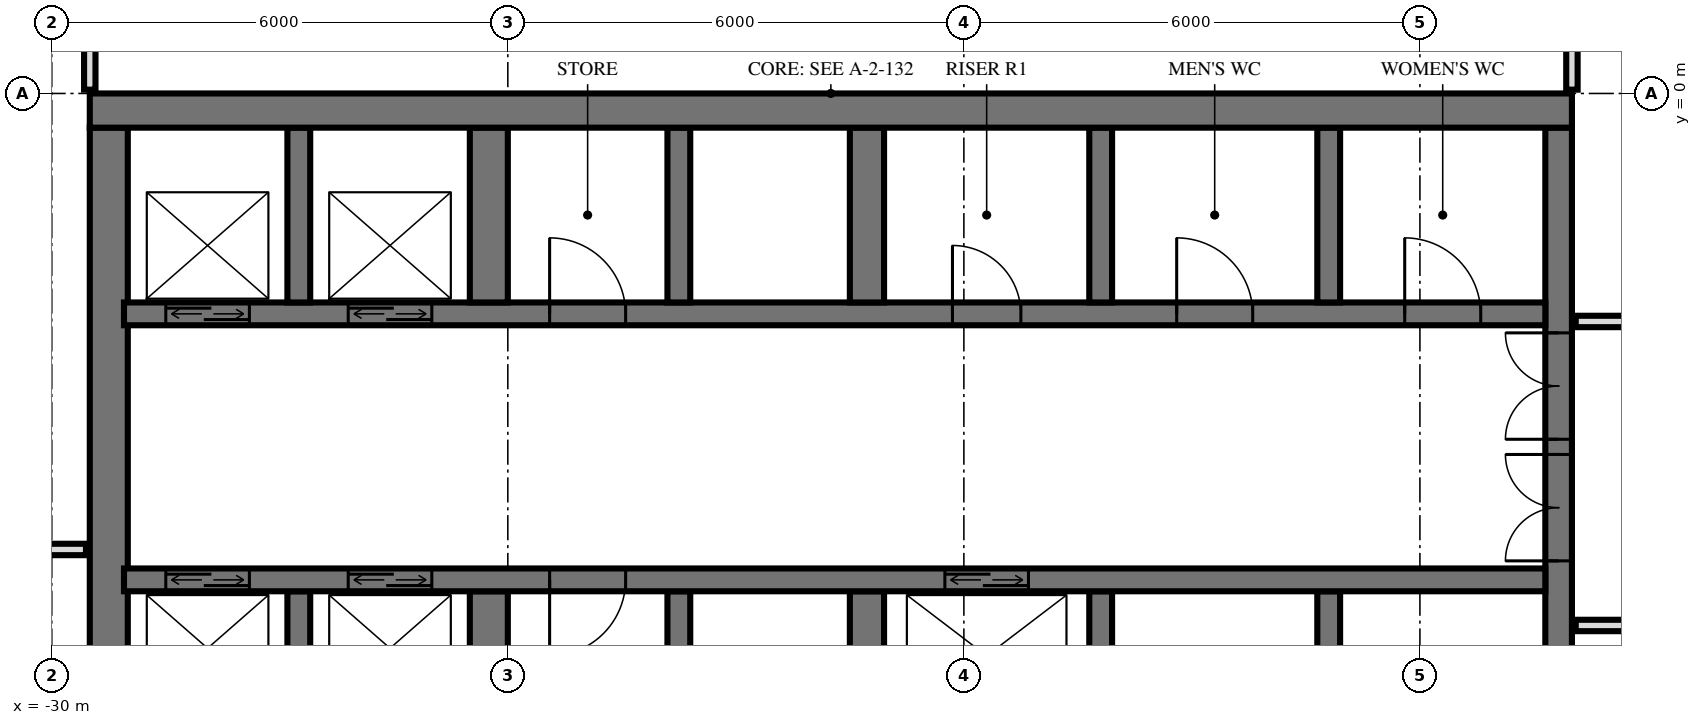
"""IFC4 building model, lengths in metres.
Left out: names, types, materials, properties, quantities, classifications, styles, units other than length and angle.
Written with IfcOpenShell. Run it as: python <this file> out.ifc"""

import sys

from ifc_helpers import new_model, si_unit, direction, frame, frame_2d, origin, place, context, subcontext, project, spatial, rectangle, extrude, element, fill, save


model = new_model("IFC4")
c1 = context("Model", 3, precision=1e-05, world=origin(), true_north=direction((0.0, 1.0)))
c2 = subcontext(c1, "Body", "Model", "MODEL_VIEW")
j1 = project(units=[si_unit("LENGTHUNIT", "METRE"), si_unit("PLANEANGLEUNIT", "RADIAN")], contexts=[c1])
p1 = place(None, origin())
s1 = spatial("IfcSite", under=j1, at=p1, CompositionType="ELEMENT")
p2 = place(p1, origin())
s2 = spatial("IfcBuilding", under=s1, at=p2, CompositionType="ELEMENT")
p3 = place(p2, frame((0.0, 0.0, 52.8)))
s3 = spatial("IfcBuildingStorey", under=s2, at=p3, CompositionType="ELEMENT", Elevation=52.8)
p4 = place(p3, frame((-29.5, -0.225, 0.0), z_axis=(0.0, 0.0, 1.0), x_axis=(1.0, 0.0, 0.0)))
e1 = element("IfcWall", 1, at=p4, inside=s3, PredefinedType="SHEAR", context=c2, shape_type="SweptSolid", body=[
    extrude(rectangle(XDim=19.5, YDim=0.45, at=frame_2d((9.75, 0.0))), origin(), (0.0, 0.0, 1.0), 3.6),
])
p5 = place(p3, frame((-10.175, -14.55, 0.0), z_axis=(0.0, 0.0, 1.0), x_axis=(0.0, 1.0, 0.0)))
e2 = element("IfcWall", 2, at=p5, inside=s3, PredefinedType="SHEAR", context=c2, shape_type="SweptSolid", body=[
    extrude(rectangle(XDim=14.1, YDim=0.35, at=frame_2d((7.05, 0.0))), origin(), (0.0, 0.0, 1.0), 3.6),
])
p6 = place(p5, frame((8.4, 0.0, 0.0)))
e3 = element("IfcOpeningElement", 3, at=p6, cuts=e2, PredefinedType="OPENING", context=c2, shape_type="SweptSolid", body=[
    extrude(rectangle(XDim=1.4, YDim=2.4, at=frame_2d((0.7, 1.2))), frame((0.0, 0.185, 0.0), z_axis=(0.0, -1.0, 0.0), x_axis=(1.0, 0.0, 0.0)), (0.0, 0.0, 1.0), 0.37),
])
p7 = place(p5, frame((10.0, 0.0, 0.0)))
e4 = element("IfcOpeningElement", 4, at=p7, cuts=e2, PredefinedType="OPENING", context=c2, shape_type="SweptSolid", body=[
    extrude(rectangle(XDim=1.4, YDim=2.4, at=frame_2d((0.7, 1.2))), frame((0.0, 0.185, 0.0), z_axis=(0.0, -1.0, 0.0), x_axis=(1.0, 0.0, 0.0)), (0.0, 0.0, 1.0), 0.37),
])
p8 = place(p5, frame((4.0, 0.0, 0.0)))
e5 = element("IfcOpeningElement", 5, at=p8, cuts=e2, PredefinedType="OPENING", context=c2, shape_type="SweptSolid", body=[
    extrude(rectangle(XDim=1.2, YDim=2.1, at=frame_2d((0.6, 1.05))), frame((0.0, 0.185, 0.0), z_axis=(0.0, -1.0, 0.0), x_axis=(1.0, 0.0, 0.0)), (0.0, 0.0, 1.0), 0.37),
])
p9 = place(p3, frame((-29.25, -14.55, 0.0), z_axis=(0.0, 0.0, 1.0), x_axis=(0.0, 1.0, 0.0)))
e6 = element("IfcWall", 6, at=p9, inside=s3, PredefinedType="SHEAR", context=c2, shape_type="SweptSolid", body=[
    extrude(rectangle(XDim=14.1, YDim=0.5, at=frame_2d((7.05, 0.0))), origin(), (0.0, 0.0, 1.0), 3.6),
])
p10 = place(p3, frame((-29.05, -2.9, 0.0), z_axis=(0.0, 0.0, 1.0), x_axis=(1.0, 0.0, 0.0)))
e7 = element("IfcWall", 7, at=p10, inside=s3, PredefinedType="SHEAR", context=c2, shape_type="SweptSolid", body=[
    extrude(rectangle(XDim=18.7, YDim=0.3, at=frame_2d((9.35, 0.0))), origin(), (0.0, 0.0, 1.0), 3.6),
])
p11 = place(p10, frame((2.95, 0.0, 0.0)))
e8 = element("IfcOpeningElement", 8, at=p11, cuts=e7, PredefinedType="OPENING", context=c2, shape_type="SweptSolid", body=[
    extrude(rectangle(XDim=1.1, YDim=2.1, at=frame_2d((0.55, 1.05))), frame((0.0, 0.16, 0.0), z_axis=(0.0, -1.0, 0.0), x_axis=(1.0, 0.0, 0.0)), (0.0, 0.0, 1.0), 0.32),
])
p12 = place(p10, frame((0.55, 0.0, 0.0)))
e9 = element("IfcOpeningElement", 9, at=p12, cuts=e7, PredefinedType="OPENING", context=c2, shape_type="SweptSolid", body=[
    extrude(rectangle(XDim=1.1, YDim=2.1, at=frame_2d((0.55, 1.05))), frame((0.0, 0.16, 0.0), z_axis=(0.0, -1.0, 0.0), x_axis=(1.0, 0.0, 0.0)), (0.0, 0.0, 1.0), 0.32),
])
p13 = place(p10, frame((10.9, 0.0, 0.0)))
e10 = element("IfcOpeningElement", 10, at=p13, cuts=e7, PredefinedType="OPENING", context=c2, shape_type="SweptSolid", body=[
    extrude(rectangle(XDim=0.9, YDim=2.1, at=frame_2d((0.45, 1.05))), frame((0.0, 0.16, 0.0), z_axis=(0.0, -1.0, 0.0), x_axis=(1.0, 0.0, 0.0)), (0.0, 0.0, 1.0), 0.32),
])
p14 = place(p10, frame((16.85, 0.0, 0.0)))
e11 = element("IfcOpeningElement", 11, at=p14, cuts=e7, PredefinedType="OPENING", context=c2, shape_type="SweptSolid", body=[
    extrude(rectangle(XDim=1.0, YDim=2.1, at=frame_2d((0.5, 1.05))), frame((0.0, 0.16, 0.0), z_axis=(0.0, -1.0, 0.0), x_axis=(1.0, 0.0, 0.0)), (0.0, 0.0, 1.0), 0.32),
])
p15 = place(p10, frame((13.85, 0.0, 0.0)))
e12 = element("IfcOpeningElement", 12, at=p15, cuts=e7, PredefinedType="OPENING", context=c2, shape_type="SweptSolid", body=[
    extrude(rectangle(XDim=1.0, YDim=2.1, at=frame_2d((0.5, 1.05))), frame((0.0, 0.16, 0.0), z_axis=(0.0, -1.0, 0.0), x_axis=(1.0, 0.0, 0.0)), (0.0, 0.0, 1.0), 0.32),
])
p16 = place(p10, frame((5.6, 0.0, 0.0)))
e13 = element("IfcOpeningElement", 13, at=p16, cuts=e7, PredefinedType="OPENING", context=c2, shape_type="SweptSolid", body=[
    extrude(rectangle(XDim=1.0, YDim=2.1, at=frame_2d((0.5, 1.05))), frame((0.0, 0.16, 0.0), z_axis=(0.0, -1.0, 0.0), x_axis=(1.0, 0.0, 0.0)), (0.0, 0.0, 1.0), 0.32),
])
p17 = place(p3, frame((-29.05, -6.4, 0.0), z_axis=(0.0, 0.0, 1.0), x_axis=(1.0, 0.0, 0.0)))
e14 = element("IfcWall", 14, at=p17, inside=s3, PredefinedType="SHEAR", context=c2, shape_type="SweptSolid", body=[
    extrude(rectangle(XDim=18.7, YDim=0.3, at=frame_2d((9.35, 0.0))), origin(), (0.0, 0.0, 1.0), 3.6),
])
p18 = place(p17, frame((2.95, 0.0, 0.0)))
e15 = element("IfcOpeningElement", 15, at=p18, cuts=e14, PredefinedType="OPENING", context=c2, shape_type="SweptSolid", body=[
    extrude(rectangle(XDim=1.1, YDim=2.1, at=frame_2d((0.55, 1.05))), frame((0.0, 0.16, 0.0), z_axis=(0.0, -1.0, 0.0), x_axis=(1.0, 0.0, 0.0)), (0.0, 0.0, 1.0), 0.32),
])
p19 = place(p17, frame((0.55, 0.0, 0.0)))
e16 = element("IfcOpeningElement", 16, at=p19, cuts=e14, PredefinedType="OPENING", context=c2, shape_type="SweptSolid", body=[
    extrude(rectangle(XDim=1.1, YDim=2.1, at=frame_2d((0.55, 1.05))), frame((0.0, 0.16, 0.0), z_axis=(0.0, -1.0, 0.0), x_axis=(1.0, 0.0, 0.0)), (0.0, 0.0, 1.0), 0.32),
])
p20 = place(p17, frame((10.8, 0.0, 0.0)))
e17 = element("IfcOpeningElement", 17, at=p20, cuts=e14, PredefinedType="OPENING", context=c2, shape_type="SweptSolid", body=[
    extrude(rectangle(XDim=1.1, YDim=2.1, at=frame_2d((0.55, 1.05))), frame((0.0, 0.16, 0.0), z_axis=(0.0, -1.0, 0.0), x_axis=(1.0, 0.0, 0.0)), (0.0, 0.0, 1.0), 0.32),
])
p21 = place(p17, frame((5.6, 0.0, 0.0)))
e18 = element("IfcOpeningElement", 18, at=p21, cuts=e14, PredefinedType="OPENING", context=c2, shape_type="SweptSolid", body=[
    extrude(rectangle(XDim=1.0, YDim=2.1, at=frame_2d((0.5, 1.05))), frame((0.0, 0.16, 0.0), z_axis=(0.0, -1.0, 0.0), x_axis=(1.0, 0.0, 0.0)), (0.0, 0.0, 1.0), 0.32),
])
for number, where, z_axis, x_axis in (
    (19, (-13.2, -2.75, 0.0), (0.0, 0.0, 1.0), (0.0, 1.0, 0.0)),
    (20, (-13.2, -8.85, 0.0), (0.0, 0.0, 1.0), (0.0, 1.0, 0.0)),
    (21, (-16.2, -2.75, 0.0), (0.0, 0.0, 1.0), (0.0, 1.0, 0.0)),
    (22, (-16.2, -8.85, 0.0), (0.0, 0.0, 1.0), (0.0, 1.0, 0.0)),
):
    element("IfcWall", number, at=place(p3, frame(where, z_axis=z_axis, x_axis=x_axis)), inside=s3, PredefinedType="SHEAR", context=c2, shape_type="SweptSolid", body=[
        extrude(rectangle(XDim=2.3, YDim=0.3, at=frame_2d((1.15, 0.0))), origin(), (0.0, 0.0, 1.0), 3.6),
    ])
for number, where, z_axis, x_axis in (
    (23, (-19.275, -2.75, 0.0), (0.0, 0.0, 1.0), (0.0, 1.0, 0.0)),
    (24, (-19.275, -8.85, 0.0), (0.0, 0.0, 1.0), (0.0, 1.0, 0.0)),
):
    element("IfcWall", number, at=place(p3, frame(where, z_axis=z_axis, x_axis=x_axis)), inside=s3, PredefinedType="SHEAR", context=c2, shape_type="SweptSolid", body=[
        extrude(rectangle(XDim=2.3, YDim=0.45, at=frame_2d((1.15, 0.0))), origin(), (0.0, 0.0, 1.0), 3.6),
    ])
for number, where, z_axis, x_axis in (
    (25, (-21.75, -2.75, 0.0), (0.0, 0.0, 1.0), (0.0, 1.0, 0.0)),
    (26, (-21.75, -8.85, 0.0), (0.0, 0.0, 1.0), (0.0, 1.0, 0.0)),
):
    element("IfcWall", number, at=place(p3, frame(where, z_axis=z_axis, x_axis=x_axis)), inside=s3, PredefinedType="SHEAR", context=c2, shape_type="SweptSolid", body=[
        extrude(rectangle(XDim=2.3, YDim=0.3, at=frame_2d((1.15, 0.0))), origin(), (0.0, 0.0, 1.0), 3.6),
    ])
for number, where, z_axis, x_axis in (
    (27, (-24.25, -2.75, 0.0), (0.0, 0.0, 1.0), (0.0, 1.0, 0.0)),
    (28, (-24.25, -8.85, 0.0), (0.0, 0.0, 1.0), (0.0, 1.0, 0.0)),
):
    element("IfcWall", number, at=place(p3, frame(where, z_axis=z_axis, x_axis=x_axis)), inside=s3, PredefinedType="SHEAR", context=c2, shape_type="SweptSolid", body=[
        extrude(rectangle(XDim=2.3, YDim=0.5, at=frame_2d((1.15, 0.0))), origin(), (0.0, 0.0, 1.0), 3.6),
    ])
for number, where, z_axis, x_axis in (
    (29, (-26.75, -2.75, 0.0), (0.0, 0.0, 1.0), (0.0, 1.0, 0.0)),
    (30, (-26.75, -8.85, 0.0), (0.0, 0.0, 1.0), (0.0, 1.0, 0.0)),
):
    element("IfcWall", number, at=place(p3, frame(where, z_axis=z_axis, x_axis=x_axis)), inside=s3, PredefinedType="SHEAR", context=c2, shape_type="SweptSolid", body=[
        extrude(rectangle(XDim=2.3, YDim=0.3, at=frame_2d((1.15, 0.0))), origin(), (0.0, 0.0, 1.0), 3.6),
    ])
p22 = place(p3, frame((-10.0, 0.05, 0.0), z_axis=(0.0, 0.0, 1.0), x_axis=(0.0, 1.0, 0.0)))
e31 = element("IfcWall", 31, at=p22, inside=s3, PredefinedType="PARTITIONING", context=c2, shape_type="SweptSolid", body=[
    extrude(rectangle(XDim=0.97, YDim=0.15, at=frame_2d((0.485, 0.0))), origin(), (0.0, 0.0, 1.0), 3.32),
])
p23 = place(p3, frame((-29.5, 0.05, 0.0), z_axis=(0.0, 0.0, 1.0), x_axis=(0.0, 1.0, 0.0)))
e32 = element("IfcWall", 32, at=p23, inside=s3, PredefinedType="PARTITIONING", context=c2, shape_type="SweptSolid", body=[
    extrude(rectangle(XDim=0.827, YDim=0.15, at=frame_2d((0.414, 0.0))), origin(), (0.0, 0.0, 1.0), 3.32),
])
p24 = place(p3, frame((-9.95, -7.0, 0.0), z_axis=(0.0, 0.0, 1.0), x_axis=(1.0, 0.0, 0.0)))
e33 = element("IfcWall", 33, at=p24, inside=s3, PredefinedType="PARTITIONING", context=c2, shape_type="SweptSolid", body=[
    extrude(rectangle(XDim=19.9, YDim=0.15, at=frame_2d((9.95, 0.0))), origin(), (0.0, 0.0, 1.0), 3.32),
])
p25 = place(p24, frame((9.45, 0.0, 0.0)))
e34 = element("IfcOpeningElement", 34, at=p25, cuts=e33, PredefinedType="OPENING", context=c2, shape_type="SweptSolid", body=[
    extrude(rectangle(XDim=1.0, YDim=2.1, at=frame_2d((0.5, 1.05))), frame((0.0, 0.085, 0.0), z_axis=(0.0, -1.0, 0.0), x_axis=(1.0, 0.0, 0.0)), (0.0, 0.0, 1.0), 0.17),
])
p26 = place(p24, frame((3.45, 0.0, 0.0)))
e35 = element("IfcOpeningElement", 35, at=p26, cuts=e33, PredefinedType="OPENING", context=c2, shape_type="SweptSolid", body=[
    extrude(rectangle(XDim=1.0, YDim=2.1, at=frame_2d((0.5, 1.05))), frame((0.0, 0.085, 0.0), z_axis=(0.0, -1.0, 0.0), x_axis=(1.0, 0.0, 0.0)), (0.0, 0.0, 1.0), 0.17),
])
p27 = place(p3, frame((-33.12, -6.0, 0.0), z_axis=(0.0, 0.0, 1.0), x_axis=(1.0, 0.0, 0.0)))
e36 = element("IfcWall", 36, at=p27, inside=s3, PredefinedType="PLUMBINGWALL", context=c2, shape_type="SweptSolid", body=[
    extrude(rectangle(XDim=3.57, YDim=0.15, at=frame_2d((1.785, 0.0))), origin(), (0.0, 0.0, 1.0), 3.32),
])
p28 = place(p27, frame((1.27, 0.0, 0.0)))
e37 = element("IfcOpeningElement", 37, at=p28, cuts=e36, PredefinedType="OPENING", context=c2, shape_type="SweptSolid", body=[
    extrude(rectangle(XDim=0.9, YDim=2.1, at=frame_2d((0.45, 1.05))), frame((0.0, 0.085, 0.0), z_axis=(0.0, -1.0, 0.0), x_axis=(1.0, 0.0, 0.0)), (0.0, 0.0, 1.0), 0.17),
])
p29 = place(p3, frame((-9.95, -3.0, 0.0), z_axis=(0.0, 0.0, 1.0), x_axis=(1.0, 0.0, 0.0)))
e38 = element("IfcWall", 38, at=p29, inside=s3, PredefinedType="PARTITIONING", context=c2, shape_type="SweptSolid", body=[
    extrude(rectangle(XDim=19.9, YDim=0.15, at=frame_2d((9.95, 0.0))), origin(), (0.0, 0.0, 1.0), 3.32),
])
p30 = place(p29, frame((4.2, 0.0, 0.0)))
e39 = element("IfcOpeningElement", 39, at=p30, cuts=e38, PredefinedType="OPENING", context=c2, shape_type="SweptSolid", body=[
    extrude(rectangle(XDim=1.0, YDim=2.1, at=frame_2d((0.5, 1.05))), frame((0.0, 0.085, 0.0), z_axis=(0.0, -1.0, 0.0), x_axis=(1.0, 0.0, 0.0)), (0.0, 0.0, 1.0), 0.17),
])
p31 = place(p29, frame((11.45, 0.0, 0.0)))
e40 = element("IfcOpeningElement", 40, at=p31, cuts=e38, PredefinedType="OPENING", context=c2, shape_type="SweptSolid", body=[
    extrude(rectangle(XDim=1.0, YDim=2.1, at=frame_2d((0.5, 1.05))), frame((0.0, 0.085, 0.0), z_axis=(0.0, -1.0, 0.0), x_axis=(1.0, 0.0, 0.0)), (0.0, 0.0, 1.0), 0.17),
])
p32 = place(p29, frame((15.45, 0.0, 0.0)))
e41 = element("IfcOpeningElement", 41, at=p32, cuts=e38, PredefinedType="OPENING", context=c2, shape_type="SweptSolid", body=[
    extrude(rectangle(XDim=1.0, YDim=2.1, at=frame_2d((0.5, 1.05))), frame((0.0, 0.085, 0.0), z_axis=(0.0, -1.0, 0.0), x_axis=(1.0, 0.0, 0.0)), (0.0, 0.0, 1.0), 0.17),
])
p33 = place(p29, frame((18.2, 0.0, 0.0)))
e42 = element("IfcOpeningElement", 42, at=p33, cuts=e38, PredefinedType="OPENING", context=c2, shape_type="SweptSolid", body=[
    extrude(rectangle(XDim=1.0, YDim=2.1, at=frame_2d((0.5, 1.05))), frame((0.0, 0.085, 0.0), z_axis=(0.0, -1.0, 0.0), x_axis=(1.0, 0.0, 0.0)), (0.0, 0.0, 1.0), 0.17),
])
p34 = place(p11, origin())
e43 = element("IfcDoor", 43, at=p34, inside=s3, OperationType="DOUBLE_DOOR_SLIDING", PredefinedType="USERDEFINED", context=c2, shape_type="SweptSolid", body=[
    extrude(rectangle(XDim=1.1, YDim=2.1, at=frame_2d((0.55, 1.05))), frame((0.0, 0.025, 0.0), z_axis=(0.0, -1.0, 0.0), x_axis=(1.0, 0.0, 0.0)), (0.0, 0.0, 1.0), 0.05),
])
fill(e8, e43)
p35 = place(p12, origin())
e44 = element("IfcDoor", 44, at=p35, inside=s3, OperationType="DOUBLE_DOOR_SLIDING", PredefinedType="USERDEFINED", context=c2, shape_type="SweptSolid", body=[
    extrude(rectangle(XDim=1.1, YDim=2.1, at=frame_2d((0.55, 1.05))), frame((0.0, 0.025, 0.0), z_axis=(0.0, -1.0, 0.0), x_axis=(1.0, 0.0, 0.0)), (0.0, 0.0, 1.0), 0.05),
])
fill(e9, e44)
p36 = place(p18, origin())
e45 = element("IfcDoor", 45, at=p36, inside=s3, OperationType="DOUBLE_DOOR_SLIDING", PredefinedType="USERDEFINED", context=c2, shape_type="SweptSolid", body=[
    extrude(rectangle(XDim=1.1, YDim=2.1, at=frame_2d((0.55, 1.05))), frame((0.0, 0.025, 0.0), z_axis=(0.0, -1.0, 0.0), x_axis=(1.0, 0.0, 0.0)), (0.0, 0.0, 1.0), 0.05),
])
fill(e15, e45)
p37 = place(p19, origin())
e46 = element("IfcDoor", 46, at=p37, inside=s3, OperationType="DOUBLE_DOOR_SLIDING", PredefinedType="USERDEFINED", context=c2, shape_type="SweptSolid", body=[
    extrude(rectangle(XDim=1.1, YDim=2.1, at=frame_2d((0.55, 1.05))), frame((0.0, 0.025, 0.0), z_axis=(0.0, -1.0, 0.0), x_axis=(1.0, 0.0, 0.0)), (0.0, 0.0, 1.0), 0.05),
])
fill(e16, e46)
p38 = place(p20, origin())
e47 = element("IfcDoor", 47, at=p38, inside=s3, OperationType="DOUBLE_DOOR_SLIDING", PredefinedType="USERDEFINED", context=c2, shape_type="SweptSolid", body=[
    extrude(rectangle(XDim=1.1, YDim=2.1, at=frame_2d((0.55, 1.05))), frame((0.0, 0.025, 0.0), z_axis=(0.0, -1.0, 0.0), x_axis=(1.0, 0.0, 0.0)), (0.0, 0.0, 1.0), 0.05),
])
fill(e17, e47)
p39 = place(p6, origin())
e48 = element("IfcDoor", 48, at=p39, inside=s3, OperationType="DOUBLE_DOOR_SINGLE_SWING", PredefinedType="DOOR", context=c2, shape_type="SweptSolid", body=[
    extrude(rectangle(XDim=1.4, YDim=2.4, at=frame_2d((0.7, 1.2))), frame((0.0, 0.025, 0.0), z_axis=(0.0, -1.0, 0.0), x_axis=(1.0, 0.0, 0.0)), (0.0, 0.0, 1.0), 0.05),
])
fill(e3, e48)
p40 = place(p7, origin())
e49 = element("IfcDoor", 49, at=p40, inside=s3, OperationType="DOUBLE_DOOR_SINGLE_SWING", PredefinedType="DOOR", context=c2, shape_type="SweptSolid", body=[
    extrude(rectangle(XDim=1.4, YDim=2.4, at=frame_2d((0.7, 1.2))), frame((0.0, 0.025, 0.0), z_axis=(0.0, -1.0, 0.0), x_axis=(1.0, 0.0, 0.0)), (0.0, 0.0, 1.0), 0.05),
])
fill(e4, e49)
p41 = place(p13, origin())
e50 = element("IfcDoor", 50, at=p41, inside=s3, OperationType="SINGLE_SWING_RIGHT", PredefinedType="DOOR", context=c2, shape_type="SweptSolid", body=[
    extrude(rectangle(XDim=0.9, YDim=2.1, at=frame_2d((0.45, 1.05))), frame((0.0, 0.025, 0.0), z_axis=(0.0, -1.0, 0.0), x_axis=(1.0, 0.0, 0.0)), (0.0, 0.0, 1.0), 0.05),
])
fill(e10, e50)
p42 = place(p14, origin())
e51 = element("IfcDoor", 51, at=p42, inside=s3, OperationType="SINGLE_SWING_RIGHT", PredefinedType="DOOR", context=c2, shape_type="SweptSolid", body=[
    extrude(rectangle(XDim=1.0, YDim=2.1, at=frame_2d((0.5, 1.05))), frame((0.0, 0.025, 0.0), z_axis=(0.0, -1.0, 0.0), x_axis=(1.0, 0.0, 0.0)), (0.0, 0.0, 1.0), 0.05),
])
fill(e11, e51)
p43 = place(p15, origin())
e52 = element("IfcDoor", 52, at=p43, inside=s3, OperationType="SINGLE_SWING_RIGHT", PredefinedType="DOOR", context=c2, shape_type="SweptSolid", body=[
    extrude(rectangle(XDim=1.0, YDim=2.1, at=frame_2d((0.5, 1.05))), frame((0.0, 0.025, 0.0), z_axis=(0.0, -1.0, 0.0), x_axis=(1.0, 0.0, 0.0)), (0.0, 0.0, 1.0), 0.05),
])
fill(e12, e52)
p44 = place(p16, origin())
e53 = element("IfcDoor", 53, at=p44, inside=s3, OperationType="SINGLE_SWING_RIGHT", PredefinedType="DOOR", context=c2, shape_type="SweptSolid", body=[
    extrude(rectangle(XDim=1.0, YDim=2.1, at=frame_2d((0.5, 1.05))), frame((0.0, 0.025, 0.0), z_axis=(0.0, -1.0, 0.0), x_axis=(1.0, 0.0, 0.0)), (0.0, 0.0, 1.0), 0.05),
])
fill(e13, e53)
p45 = place(p21, frame((0.5, 0.0, 0.0), z_axis=(0.0, 0.0, 1.0), x_axis=(-1.0, 0.0, 0.0)))
e54 = element("IfcDoor", 54, at=p45, inside=s3, OperationType="SINGLE_SWING_LEFT", PredefinedType="DOOR", context=c2, shape_type="SweptSolid", body=[
    extrude(rectangle(XDim=1.0, YDim=2.1, at=frame_2d((0.0, 1.05))), frame((0.0, -0.025, 0.0), z_axis=(0.0, 1.0, 0.0), x_axis=(-1.0, 0.0, 0.0)), (0.0, 0.0, 1.0), 0.05),
])
fill(e18, e54)
save(model, sys.argv[1])
